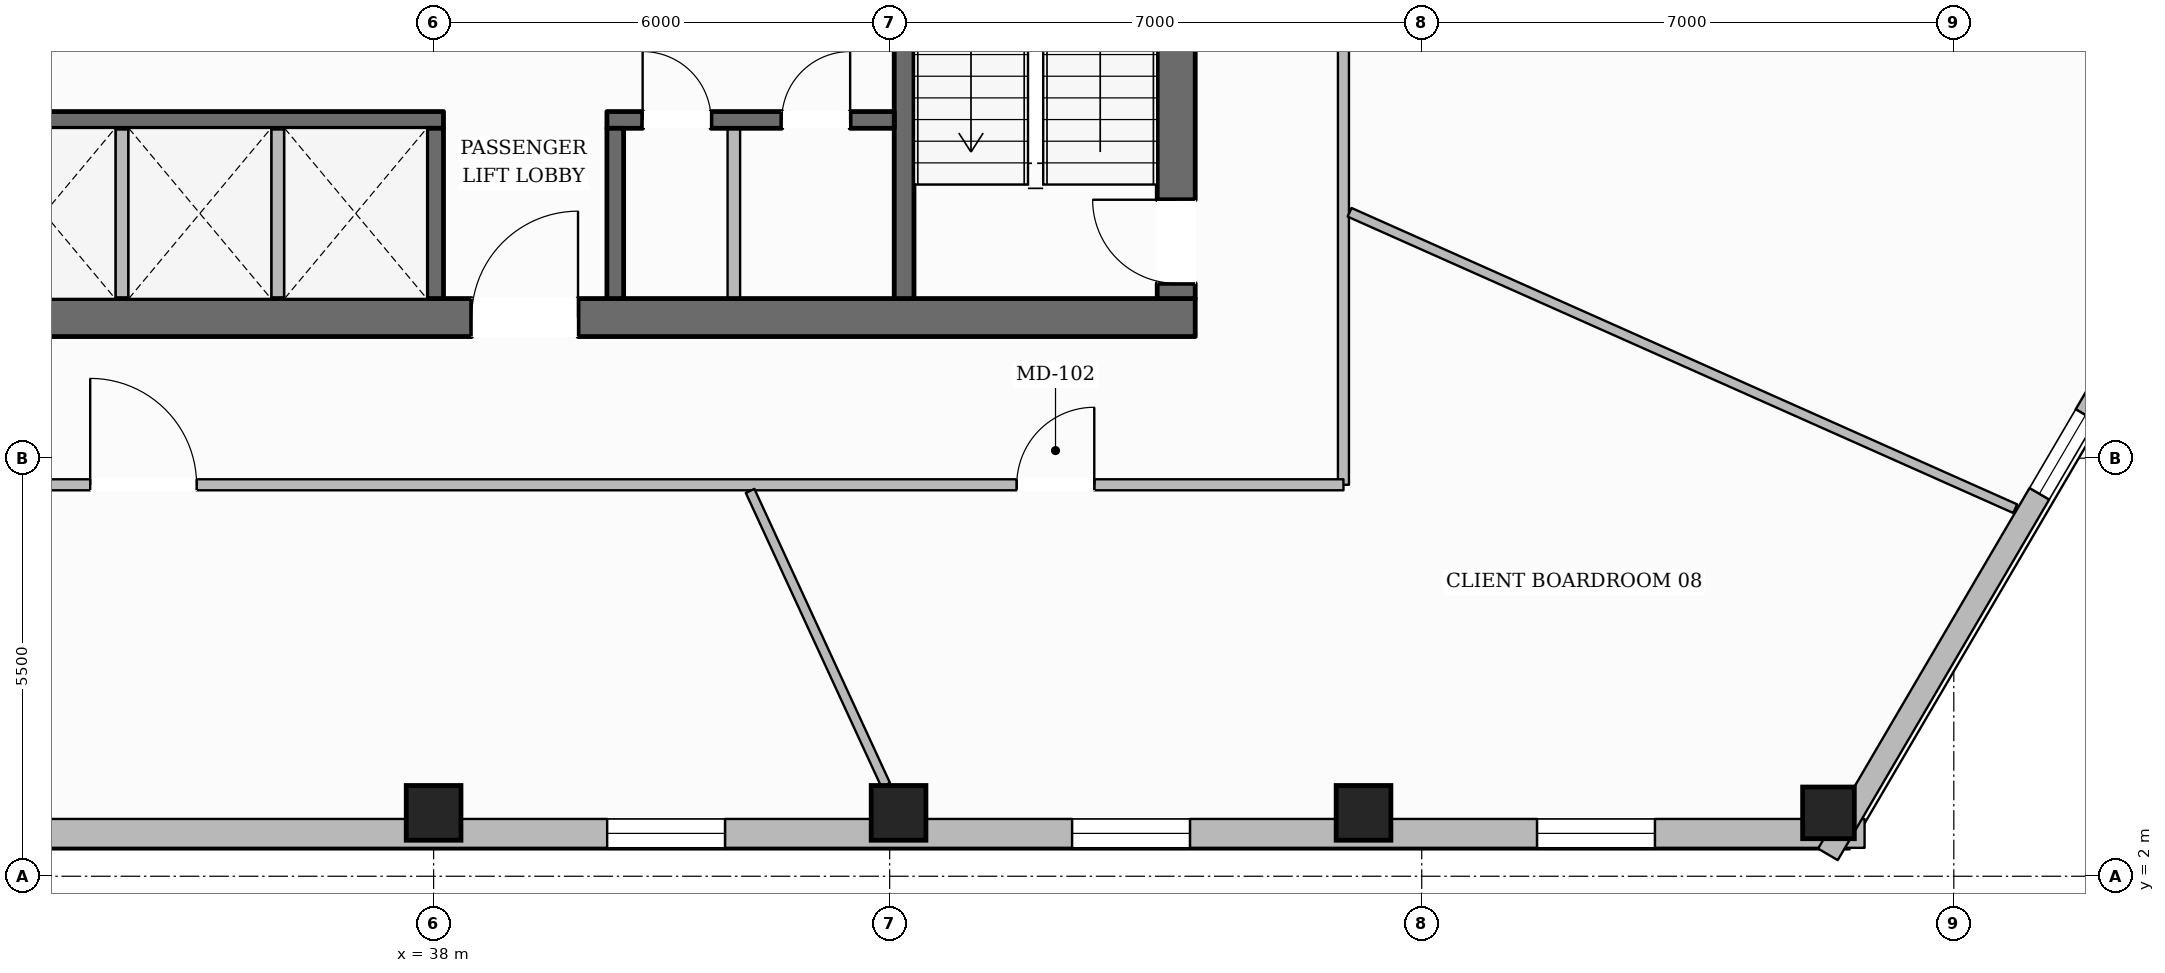
"""IFC4 building model, lengths in metres.
Left out: names, types, materials, properties, quantities, classifications, styles, units other than length and angle.
Written with IfcOpenShell. Run it as: python <this file> out.ifc"""

import sys

from ifc_helpers import new_model, si_unit, direction, frame, frame_2d, origin, origin_2d, place, context, subcontext, project, spatial, rectangle, hollow_rectangle, extrude, element, fill, save


model = new_model("IFC4")
c1 = context("Model", 3, precision=1e-05, world=origin(), true_north=direction((0.0, 1.0)))
c2 = subcontext(c1, "Body", "Model", "MODEL_VIEW")
j1 = project(units=[si_unit("LENGTHUNIT", "METRE"), si_unit("PLANEANGLEUNIT", "RADIAN")], contexts=[c1])
p1 = place(None, origin())
s1 = spatial("IfcSite", under=j1, at=p1, CompositionType="ELEMENT")
p2 = place(p1, origin())
s2 = spatial("IfcBuilding", under=s1, at=p2, CompositionType="ELEMENT")
p3 = place(p2, frame((0.0, 0.0, 131.7)))
s3 = spatial("IfcBuildingStorey", under=s2, at=p3, CompositionType="ELEMENT", Elevation=131.7)
p4 = place(p3, frame((27.98, 9.35, 0.0), z_axis=(0.0, 0.0, 1.0), x_axis=(1.0, 0.0, 0.0)))
e1 = element("IfcWall", 1, at=p4, inside=s3, PredefinedType="SOLIDWALL", context=c2, shape_type="SweptSolid", body=[
    extrude(rectangle(XDim=20.04, YDim=0.5, at=frame_2d((10.02, 0.0))), origin(), (0.0, 0.0, 1.0), 3.6),
])
p5 = place(p4, frame((10.52, 0.0, 0.0)))
e2 = element("IfcOpeningElement", 2, at=p5, cuts=e1, PredefinedType="OPENING", context=c2, shape_type="SweptSolid", body=[
    extrude(rectangle(XDim=1.4, YDim=2.2, at=frame_2d((0.7, 1.1))), frame((0.0, 0.26, 0.0), z_axis=(0.0, -1.0, 0.0), x_axis=(1.0, 0.0, 0.0)), (0.0, 0.0, 1.0), 0.52),
])
p6 = place(p3, frame((47.77, 9.6, 0.0), z_axis=(0.0, 0.0, 1.0), x_axis=(0.0, 1.0, 0.0)))
e3 = element("IfcWall", 3, at=p6, inside=s3, PredefinedType="SOLIDWALL", context=c2, shape_type="SweptSolid", body=[
    extrude(rectangle(XDim=13.0, YDim=0.5, at=frame_2d((6.5, 0.0))), origin(), (0.0, 0.0, 1.0), 3.6),
])
p7 = place(p6, frame((0.2, 0.0, 0.0)))
e4 = element("IfcOpeningElement", 4, at=p7, cuts=e3, PredefinedType="OPENING", context=c2, shape_type="SweptSolid", body=[
    extrude(rectangle(XDim=1.1, YDim=2.15, at=frame_2d((0.55, 1.075))), frame((0.0, 0.26, 0.0), z_axis=(0.0, -1.0, 0.0), x_axis=(1.0, 0.0, 0.0)), (0.0, 0.0, 1.0), 0.52),
])
p8 = place(p6, frame((8.4, 0.0, 0.0)))
e5 = element("IfcOpeningElement", 5, at=p8, cuts=e3, PredefinedType="OPENING", context=c2, shape_type="SweptSolid", body=[
    extrude(rectangle(XDim=0.9, YDim=2.1, at=frame_2d((0.45, 1.05))), frame((0.0, 0.26, 0.0), z_axis=(0.0, -1.0, 0.0), x_axis=(1.0, 0.0, 0.0)), (0.0, 0.0, 1.0), 0.52),
])
p9 = place(p3, frame((44.19, 9.6, 0.0), z_axis=(0.0, 0.0, 1.0), x_axis=(0.0, 1.0, 0.0)))
e6 = element("IfcWall", 6, at=p9, inside=s3, PredefinedType="SHEAR", context=c2, shape_type="SweptSolid", body=[
    extrude(rectangle(XDim=13.0, YDim=0.26, at=frame_2d((6.5, 0.0))), origin(), (0.0, 0.0, 1.0), 3.6),
])
p10 = place(p9, frame((10.925, 0.0, 0.0)))
e7 = element("IfcOpeningElement", 7, at=p10, cuts=e6, PredefinedType="OPENING", context=c2, shape_type="SweptSolid", body=[
    extrude(rectangle(XDim=1.25, YDim=2.25, at=frame_2d((0.625, 1.125))), frame((0.0, 0.14, 0.0), z_axis=(0.0, -1.0, 0.0), x_axis=(1.0, 0.0, 0.0)), (0.0, 0.0, 1.0), 0.28),
])
p11 = place(p3, frame((31.94, 11.95, 0.0), z_axis=(0.0, 0.0, 1.0), x_axis=(1.0, 0.0, 0.0)))
e8 = element("IfcWall", 8, at=p11, inside=s3, PredefinedType="SOLIDWALL", context=c2, shape_type="SweptSolid", body=[
    extrude(rectangle(XDim=6.19, YDim=0.22, at=frame_2d((3.095, 0.0))), origin(), (0.0, 0.0, 1.0), 3.6),
])
p12 = place(p3, frame((40.28, 11.95, 0.0), z_axis=(0.0, 0.0, 1.0), x_axis=(1.0, 0.0, 0.0)))
e9 = element("IfcWall", 9, at=p12, inside=s3, PredefinedType="SOLIDWALL", context=c2, shape_type="SweptSolid", body=[
    extrude(rectangle(XDim=3.78, YDim=0.22, at=frame_2d((1.89, 0.0))), origin(), (0.0, 0.0, 1.0), 3.6),
])
p13 = place(p12, frame((0.47, 0.0, 0.0)))
e10 = element("IfcOpeningElement", 10, at=p13, cuts=e9, PredefinedType="OPENING", context=c2, shape_type="SweptSolid", body=[
    extrude(rectangle(XDim=0.9, YDim=2.1, at=frame_2d((0.45, 1.05))), frame((0.0, 0.12, 0.0), z_axis=(0.0, -1.0, 0.0), x_axis=(1.0, 0.0, 0.0)), (0.0, 0.0, 1.0), 0.24),
])
p14 = place(p12, frame((2.3, 0.0, 0.0)))
e11 = element("IfcOpeningElement", 11, at=p14, cuts=e9, PredefinedType="OPENING", context=c2, shape_type="SweptSolid", body=[
    extrude(rectangle(XDim=0.9, YDim=2.1, at=frame_2d((0.45, 1.05))), frame((0.0, 0.12, 0.0), z_axis=(0.0, -1.0, 0.0), x_axis=(1.0, 0.0, 0.0)), (0.0, 0.0, 1.0), 0.24),
])
for number, where, z_axis, x_axis in (
    (12, (38.02, 9.6, 0.0), (0.0, 0.0, 1.0), (0.0, 1.0, 0.0)),
    (13, (40.39, 9.6, 0.0), (0.0, 0.0, 1.0), (0.0, 1.0, 0.0)),
):
    element("IfcWall", number, at=place(p3, frame(where, z_axis=z_axis, x_axis=x_axis)), inside=s3, PredefinedType="SOLIDWALL", context=c2, shape_type="SweptSolid", body=[
        extrude(rectangle(XDim=2.24, YDim=0.22, at=frame_2d((1.12, 0.0))), origin(), (0.0, 0.0, 1.0), 3.6),
    ])
for number, where, z_axis, x_axis in (
    (14, (38.0, 2.834, 0.0), (0.0, 0.0, 1.0), (1.0, 0.0, 0.0)),
    (15, (44.117, 2.834, 0.0), (0.0, 0.0, 1.0), (1.0, 0.0, 0.0)),
    (16, (50.234, 2.834, 0.0), (0.0, 0.0, 1.0), (1.0, 0.0, 0.0)),
):
    element("IfcColumn", number, at=place(p3, frame(where, z_axis=z_axis, x_axis=x_axis)), inside=s3, PredefinedType="COLUMN", context=c2, shape_type="SweptSolid", body=[
        extrude(hollow_rectangle(XDim=0.72, YDim=0.72, WallThickness=0.032, at=origin_2d()), origin(), (0.0, 0.0, 1.0), 3.6),
    ])
p15 = place(p3, frame((56.351, 2.834, 0.0), z_axis=(0.0, 0.0, 1.0), x_axis=(1.0, 0.0, 0.0)))
e17 = element("IfcColumn", 17, at=p15, inside=s3, PredefinedType="COLUMN", context=c2, shape_type="SweptSolid", body=[
    extrude(hollow_rectangle(XDim=0.68, YDim=0.68, WallThickness=0.03, at=origin_2d()), origin(), (0.0, 0.0, 1.0), 3.6),
])
p16 = place(p3, frame((56.826, 2.564, 0.0), z_axis=(0.0, 0.0, 1.0), x_axis=(-1.0, 0.0, 0.0)))
e18 = element("IfcWall", 18, at=p16, inside=s3, PredefinedType="STANDARD", context=c2, shape_type="SweptSolid", body=[
    extrude(rectangle(XDim=37.652, YDim=0.38, at=frame_2d((18.826, 0.0))), origin(), (0.0, 0.0, 1.0), 3.059),
])
p17 = place(p16, frame((33.344, 0.0, 0.65)))
e19 = element("IfcOpeningElement", 19, at=p17, cuts=e18, PredefinedType="OPENING", context=c2, shape_type="SweptSolid", body=[
    extrude(rectangle(XDim=1.55, YDim=1.75, at=frame_2d((0.775, 0.875))), frame((0.0, 0.2, 0.0), z_axis=(0.0, -1.0, 0.0), x_axis=(1.0, 0.0, 0.0)), (0.0, 0.0, 1.0), 0.4),
])
p18 = place(p16, frame((27.227, 0.0, 0.65)))
e20 = element("IfcOpeningElement", 20, at=p18, cuts=e18, PredefinedType="OPENING", context=c2, shape_type="SweptSolid", body=[
    extrude(rectangle(XDim=1.55, YDim=1.75, at=frame_2d((0.775, 0.875))), frame((0.0, 0.2, 0.0), z_axis=(0.0, -1.0, 0.0), x_axis=(1.0, 0.0, 0.0)), (0.0, 0.0, 1.0), 0.4),
])
p19 = place(p16, frame((14.993, 0.0, 0.65)))
e21 = element("IfcOpeningElement", 21, at=p19, cuts=e18, PredefinedType="OPENING", context=c2, shape_type="SweptSolid", body=[
    extrude(rectangle(XDim=1.55, YDim=1.75, at=frame_2d((0.775, 0.875))), frame((0.0, 0.2, 0.0), z_axis=(0.0, -1.0, 0.0), x_axis=(1.0, 0.0, 0.0)), (0.0, 0.0, 1.0), 0.4),
])
p20 = place(p16, frame((8.875, 0.0, 0.65)))
e22 = element("IfcOpeningElement", 22, at=p20, cuts=e18, PredefinedType="OPENING", context=c2, shape_type="SweptSolid", body=[
    extrude(rectangle(XDim=1.55, YDim=1.75, at=frame_2d((0.775, 0.875))), frame((0.0, 0.2, 0.0), z_axis=(0.0, -1.0, 0.0), x_axis=(1.0, 0.0, 0.0)), (0.0, 0.0, 1.0), 0.4),
])
p21 = place(p16, frame((2.759, 0.0, 0.65)))
e23 = element("IfcOpeningElement", 23, at=p21, cuts=e18, PredefinedType="OPENING", context=c2, shape_type="SweptSolid", body=[
    extrude(rectangle(XDim=1.55, YDim=1.75, at=frame_2d((0.775, 0.875))), frame((0.0, 0.2, 0.0), z_axis=(0.0, -1.0, 0.0), x_axis=(1.0, 0.0, 0.0)), (0.0, 0.0, 1.0), 0.4),
])
p22 = place(p3, frame((62.515, 12.812, 0.0), z_axis=(0.0, 0.0, 1.0), x_axis=(-0.505835558362, -0.862629925227, 0.0)))
e24 = element("IfcWall", 24, at=p22, inside=s3, PredefinedType="STANDARD", context=c2, shape_type="SweptSolid", body=[
    extrude(rectangle(XDim=12.2, YDim=0.3, at=frame_2d((6.1, 0.0))), origin(), (0.0, 0.0, 1.0), 3.059),
])
p23 = place(p22, frame((5.5, 0.0, 0.65)))
e25 = element("IfcOpeningElement", 25, at=p23, cuts=e24, PredefinedType="OPENING", context=c2, shape_type="SweptSolid", body=[
    extrude(rectangle(XDim=1.2, YDim=1.7, at=frame_2d((0.6, 0.85))), frame((0.0, 0.16, 0.0), z_axis=(0.0, -1.0, 0.0), x_axis=(1.0, 0.0, 0.0)), (0.0, 0.0, 1.0), 0.32),
])
p24 = place(p3, frame((43.687, 44.364, 0.0), z_axis=(0.0, 0.0, 1.0), x_axis=(0.505829244079, -0.862633627813, 0.0)))
e26 = element("IfcWall", 26, at=p24, inside=s3, PredefinedType="STANDARD", context=c2, shape_type="SweptSolid", body=[
    extrude(rectangle(XDim=37.223, YDim=0.38, at=frame_2d((18.611, 0.0))), origin(), (0.0, 0.0, 1.0), 3.059),
])
p25 = place(p24, frame((32.944, 0.0, 0.65)))
e27 = element("IfcOpeningElement", 27, at=p25, cuts=e26, PredefinedType="OPENING", context=c2, shape_type="SweptSolid", body=[
    extrude(rectangle(XDim=1.55, YDim=1.75, at=frame_2d((0.775, 0.875))), frame((0.0, 0.2, 0.0), z_axis=(0.0, -1.0, 0.0), x_axis=(1.0, 0.0, 0.0)), (0.0, 0.0, 1.0), 0.4),
])
p26 = place(p24, frame((26.9, 0.0, 0.65)))
e28 = element("IfcOpeningElement", 28, at=p26, cuts=e26, PredefinedType="OPENING", context=c2, shape_type="SweptSolid", body=[
    extrude(rectangle(XDim=1.55, YDim=1.75, at=frame_2d((0.775, 0.875))), frame((0.0, 0.2, 0.0), z_axis=(0.0, -1.0, 0.0), x_axis=(1.0, 0.0, 0.0)), (0.0, 0.0, 1.0), 0.4),
])
p27 = place(p24, frame((14.811, 0.0, 0.65)))
e29 = element("IfcOpeningElement", 29, at=p27, cuts=e26, PredefinedType="OPENING", context=c2, shape_type="SweptSolid", body=[
    extrude(rectangle(XDim=1.55, YDim=1.75, at=frame_2d((0.775, 0.875))), frame((0.0, 0.2, 0.0), z_axis=(0.0, -1.0, 0.0), x_axis=(1.0, 0.0, 0.0)), (0.0, 0.0, 1.0), 0.4),
])
p28 = place(p24, frame((8.767, 0.0, 0.65)))
e30 = element("IfcOpeningElement", 30, at=p28, cuts=e26, PredefinedType="OPENING", context=c2, shape_type="SweptSolid", body=[
    extrude(rectangle(XDim=1.55, YDim=1.75, at=frame_2d((0.775, 0.875))), frame((0.0, 0.2, 0.0), z_axis=(0.0, -1.0, 0.0), x_axis=(1.0, 0.0, 0.0)), (0.0, 0.0, 1.0), 0.4),
])
p29 = place(p24, frame((2.722, 0.0, 0.65)))
e31 = element("IfcOpeningElement", 31, at=p29, cuts=e26, PredefinedType="OPENING", context=c2, shape_type="SweptSolid", body=[
    extrude(rectangle(XDim=1.55, YDim=1.75, at=frame_2d((0.775, 0.875))), frame((0.0, 0.2, 0.0), z_axis=(0.0, -1.0, 0.0), x_axis=(1.0, 0.0, 0.0)), (0.0, 0.0, 1.0), 0.4),
])
for number, where, z_axis, x_axis in (
    (32, (33.9, 9.55, 0.0), (0.0, 0.0, 1.0), (0.0, 1.0, 0.0)),
    (33, (35.95, 9.55, 0.0), (0.0, 0.0, 1.0), (0.0, 1.0, 0.0)),
    (34, (41.95, 9.55, 0.0), (0.0, 0.0, 1.0), (0.0, 1.0, 0.0)),
):
    element("IfcWall", number, at=place(p3, frame(where, z_axis=z_axis, x_axis=x_axis)), inside=s3, PredefinedType="PARTITIONING", context=c2, shape_type="SweptSolid", body=[
        extrude(rectangle(XDim=2.29, YDim=0.165, at=frame_2d((1.145, 0.0))), origin(), (0.0, 0.0, 1.0), 3.6),
    ])
p30 = place(p3, frame((49.97, 7.15, 0.0), z_axis=(0.0, 0.0, 1.0), x_axis=(0.0, 1.0, 0.0)))
e35 = element("IfcWall", 35, at=p30, inside=s3, PredefinedType="PARTITIONING", context=c2, shape_type="SweptSolid", body=[
    extrude(rectangle(XDim=17.9, YDim=0.145, at=frame_2d((8.95, 0.0))), origin(), (0.0, 0.0, 1.0), 3.288),
])
p31 = place(p30, frame((7.874, 0.0, 0.0)))
e36 = element("IfcOpeningElement", 36, at=p31, cuts=e35, PredefinedType="OPENING", context=c2, shape_type="SweptSolid", body=[
    extrude(rectangle(XDim=1.4, YDim=2.2, at=frame_2d((0.7, 1.1))), frame((0.0, 0.083, 0.0), z_axis=(0.0, -1.0, 0.0), x_axis=(1.0, 0.0, 0.0)), (0.0, 0.0, 1.0), 0.165),
])
p32 = place(p3, frame((26.03, 7.15, 0.0), z_axis=(0.0, 0.0, 1.0), x_axis=(1.0, 0.0, 0.0)))
e37 = element("IfcWall", 37, at=p32, inside=s3, PredefinedType="PARTITIONING", context=c2, shape_type="SweptSolid", body=[
    extrude(rectangle(XDim=23.94, YDim=0.145, at=frame_2d((11.97, 0.0))), origin(), (0.0, 0.0, 1.0), 3.6),
])
p33 = place(p32, frame((7.452, 0.0, 0.0)))
e38 = element("IfcOpeningElement", 38, at=p33, cuts=e37, PredefinedType="OPENING", context=c2, shape_type="SweptSolid", body=[
    extrude(rectangle(XDim=1.4, YDim=2.2, at=frame_2d((0.7, 1.1))), frame((0.0, 0.083, 0.0), z_axis=(0.0, -1.0, 0.0), x_axis=(1.0, 0.0, 0.0)), (0.0, 0.0, 1.0), 0.165),
])
p34 = place(p32, frame((19.642, 0.0, 0.0)))
e39 = element("IfcOpeningElement", 39, at=p34, cuts=e37, PredefinedType="OPENING", context=c2, shape_type="SweptSolid", body=[
    extrude(rectangle(XDim=1.02, YDim=2.15, at=frame_2d((0.51, 1.075))), frame((0.0, 0.083, 0.0), z_axis=(0.0, -1.0, 0.0), x_axis=(1.0, 0.0, 0.0)), (0.0, 0.0, 1.0), 0.165),
])
p35 = place(p3, frame((42.164, 7.07, 0.0), z_axis=(0.0, 0.0, 1.0), x_axis=(0.418741898832, -0.908105292443, 0.0)))
e40 = element("IfcWall", 40, at=p35, inside=s3, PredefinedType="PARTITIONING", context=c2, shape_type="SweptSolid", body=[
    extrude(rectangle(XDim=4.259, YDim=0.125, at=frame_2d((2.129, 0.0))), origin(), (0.0, 0.0, 1.0), 3.6),
])
p36 = place(p3, frame((50.051, 10.735, 0.0), z_axis=(0.0, 0.0, 1.0), x_axis=(0.913539334281, -0.406750396092, 0.0)))
e41 = element("IfcWall", 41, at=p36, inside=s3, PredefinedType="PARTITIONING", context=c2, shape_type="SweptSolid", body=[
    extrude(rectangle(XDim=9.586, YDim=0.125, at=frame_2d((4.793, 0.0))), origin(), (0.0, 0.0, 1.0), 3.6),
])
p37 = place(p19, origin())
e42 = element("IfcWindow", 42, at=p37, inside=s3, PartitioningType="SINGLE_PANEL", PredefinedType="WINDOW", context=c2, shape_type="SweptSolid", body=[
    extrude(rectangle(XDim=1.55, YDim=1.75, at=frame_2d((0.775, 0.875))), frame((0.0, 0.03, 0.0), z_axis=(0.0, -1.0, 0.0), x_axis=(1.0, 0.0, 0.0)), (0.0, 0.0, 1.0), 0.06),
])
fill(e21, e42)
p38 = place(p20, origin())
e43 = element("IfcWindow", 43, at=p38, inside=s3, PartitioningType="SINGLE_PANEL", PredefinedType="WINDOW", context=c2, shape_type="SweptSolid", body=[
    extrude(rectangle(XDim=1.55, YDim=1.75, at=frame_2d((0.775, 0.875))), frame((0.0, 0.03, 0.0), z_axis=(0.0, -1.0, 0.0), x_axis=(1.0, 0.0, 0.0)), (0.0, 0.0, 1.0), 0.06),
])
fill(e22, e43)
p39 = place(p21, origin())
e44 = element("IfcWindow", 44, at=p39, inside=s3, PartitioningType="SINGLE_PANEL", PredefinedType="WINDOW", context=c2, shape_type="SweptSolid", body=[
    extrude(rectangle(XDim=1.55, YDim=1.75, at=frame_2d((0.775, 0.875))), frame((0.0, 0.03, 0.0), z_axis=(0.0, -1.0, 0.0), x_axis=(1.0, 0.0, 0.0)), (0.0, 0.0, 1.0), 0.06),
])
fill(e23, e44)
p40 = place(p23, origin())
e45 = element("IfcWindow", 45, at=p40, inside=s3, PartitioningType="SINGLE_PANEL", PredefinedType="WINDOW", context=c2, shape_type="SweptSolid", body=[
    extrude(rectangle(XDim=1.2, YDim=1.7, at=frame_2d((0.6, 0.85))), frame((0.0, 0.03, 0.0), z_axis=(0.0, -1.0, 0.0), x_axis=(1.0, 0.0, 0.0)), (0.0, 0.0, 1.0), 0.06),
])
fill(e25, e45)
p41 = place(p7, origin())
e46 = element("IfcDoor", 46, at=p41, inside=s3, OperationType="SINGLE_SWING_RIGHT", PredefinedType="DOOR", context=c2, shape_type="SweptSolid", body=[
    extrude(rectangle(XDim=1.1, YDim=2.15, at=frame_2d((0.55, 1.075))), frame((0.0, 0.025, 0.0), z_axis=(0.0, -1.0, 0.0), x_axis=(1.0, 0.0, 0.0)), (0.0, 0.0, 1.0), 0.05),
])
fill(e4, e46)
p42 = place(p5, origin())
e47 = element("IfcDoor", 47, at=p42, inside=s3, OperationType="SINGLE_SWING_RIGHT", PredefinedType="DOOR", context=c2, shape_type="SweptSolid", body=[
    extrude(rectangle(XDim=1.4, YDim=2.2, at=frame_2d((0.7, 1.1))), frame((0.0, 0.025, 0.0), z_axis=(0.0, -1.0, 0.0), x_axis=(1.0, 0.0, 0.0)), (0.0, 0.0, 1.0), 0.05),
])
fill(e2, e47)
p43 = place(p13, origin())
e48 = element("IfcDoor", 48, at=p43, inside=s3, OperationType="SINGLE_SWING_LEFT", PredefinedType="DOOR", context=c2, shape_type="SweptSolid", body=[
    extrude(rectangle(XDim=0.9, YDim=2.1, at=frame_2d((0.45, 1.05))), frame((0.0, 0.025, 0.0), z_axis=(0.0, -1.0, 0.0), x_axis=(1.0, 0.0, 0.0)), (0.0, 0.0, 1.0), 0.05),
])
fill(e10, e48)
p44 = place(p14, origin())
e49 = element("IfcDoor", 49, at=p44, inside=s3, OperationType="SINGLE_SWING_RIGHT", PredefinedType="DOOR", context=c2, shape_type="SweptSolid", body=[
    extrude(rectangle(XDim=0.9, YDim=2.1, at=frame_2d((0.45, 1.05))), frame((0.0, 0.025, 0.0), z_axis=(0.0, -1.0, 0.0), x_axis=(1.0, 0.0, 0.0)), (0.0, 0.0, 1.0), 0.05),
])
fill(e11, e49)
p45 = place(p33, origin())
e50 = element("IfcDoor", 50, at=p45, inside=s3, OperationType="SINGLE_SWING_LEFT", PredefinedType="DOOR", context=c2, shape_type="SweptSolid", body=[
    extrude(rectangle(XDim=1.4, YDim=2.2, at=frame_2d((0.7, 1.1))), frame((0.0, 0.025, 0.0), z_axis=(0.0, -1.0, 0.0), x_axis=(1.0, 0.0, 0.0)), (0.0, 0.0, 1.0), 0.05),
])
fill(e38, e50)
p46 = place(p34, origin())
e51 = element("IfcDoor", 51, at=p46, inside=s3, OperationType="SINGLE_SWING_RIGHT", PredefinedType="DOOR", context=c2, shape_type="SweptSolid", body=[
    extrude(rectangle(XDim=1.02, YDim=2.15, at=frame_2d((0.51, 1.075))), frame((0.0, 0.025, 0.0), z_axis=(0.0, -1.0, 0.0), x_axis=(1.0, 0.0, 0.0)), (0.0, 0.0, 1.0), 0.05),
])
fill(e39, e51)
save(model, sys.argv[1])
